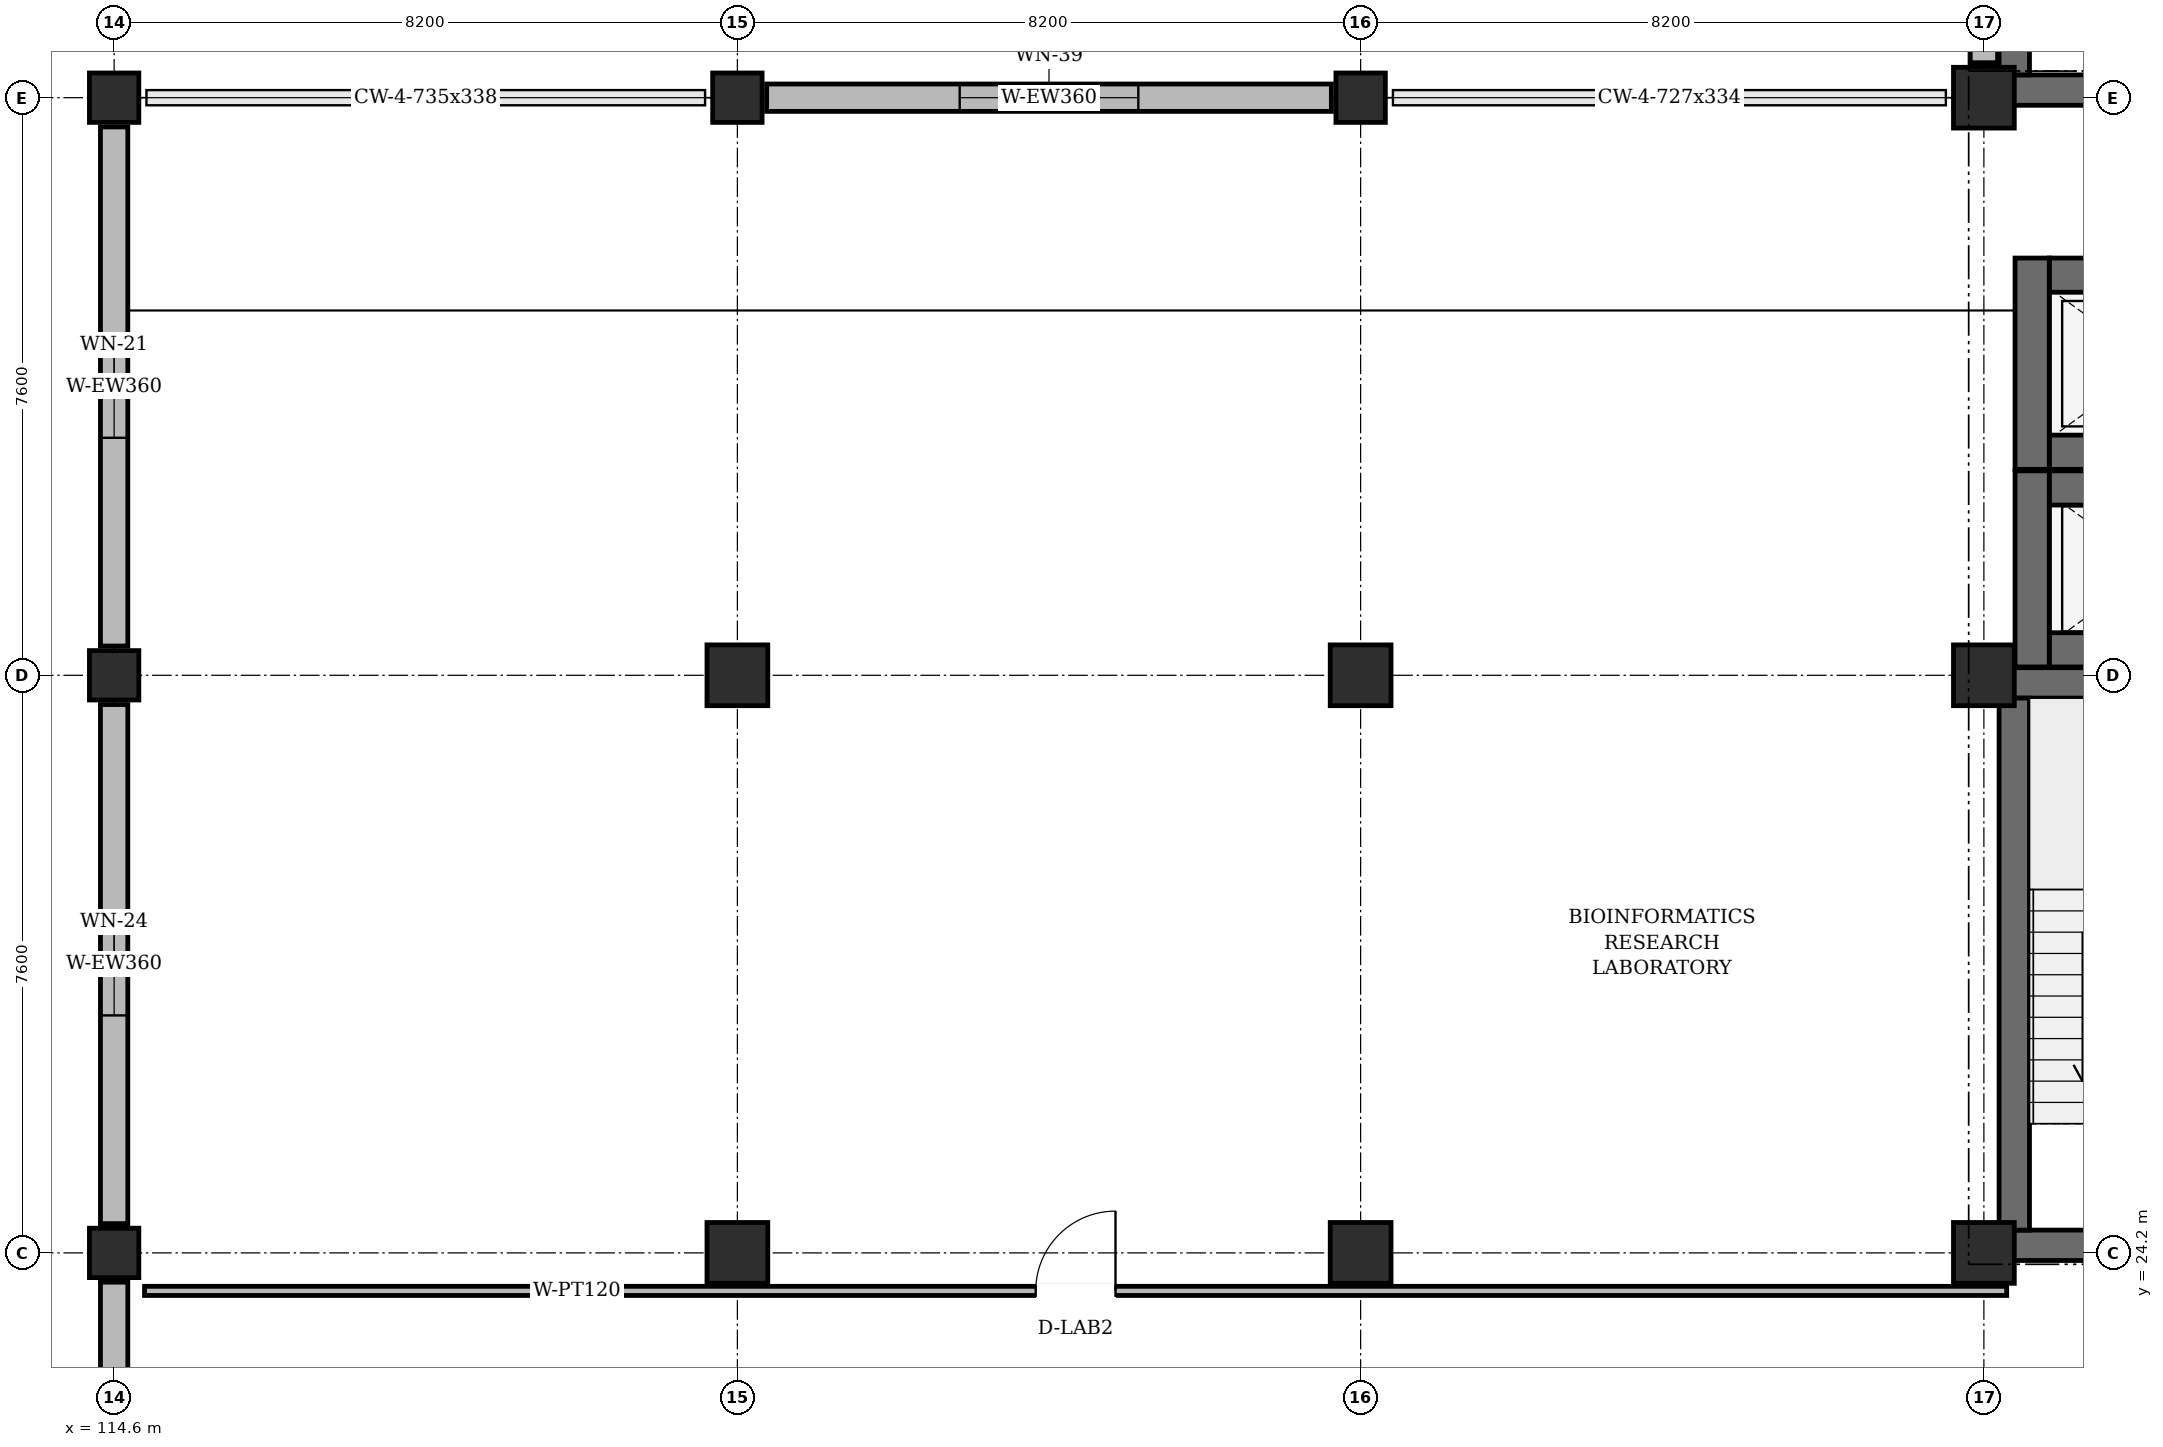
"""IFC4 building model, lengths in metres.
Left out: names, types, materials, properties, quantities, classifications, styles, units other than length and angle.
Written with IfcOpenShell. Run it as: python <this file> out.ifc"""

import sys

from ifc_helpers import new_model, si_unit, direction, frame, frame_2d, origin, origin_2d, place, context, subcontext, project, spatial, rectangle, extrude, element, fill, save


model = new_model("IFC4")
c1 = context("Model", 3, precision=1e-05, world=origin(), true_north=direction((0.0, 1.0)))
c2 = subcontext(c1, "Body", "Model", "MODEL_VIEW")
j1 = project(units=[si_unit("LENGTHUNIT", "METRE"), si_unit("PLANEANGLEUNIT", "RADIAN")], contexts=[c1])
p1 = place(None, origin())
s1 = spatial("IfcSite", under=j1, at=p1, CompositionType="ELEMENT")
p2 = place(p1, origin())
s2 = spatial("IfcBuilding", under=s1, at=p2, CompositionType="ELEMENT")
p3 = place(p2, frame((0.0, 0.0, 32.4)))
s3 = spatial("IfcBuildingStorey", under=s2, at=p3, CompositionType="ELEMENT", Elevation=32.4)
for number, where, z_axis, x_axis in (
    (1, (114.6, 24.2, 0.0), (0.0, 0.0, 1.0), (1.0, 0.0, 0.0)),
    (2, (114.6, 31.8, 0.0), (0.0, 0.0, 1.0), (1.0, 0.0, 0.0)),
    (3, (114.6, 39.4, 0.0), (0.0, 0.0, 1.0), (1.0, 0.0, 0.0)),
):
    element("IfcColumn", number, at=place(p3, frame(where, z_axis=z_axis, x_axis=x_axis)), inside=s3, PredefinedType="COLUMN", context=c2, shape_type="SweptSolid", body=[
        extrude(rectangle(XDim=0.65, YDim=0.65, at=origin_2d()), origin(), (0.0, 0.0, 1.0), 3.985),
    ])
for number, where, z_axis, x_axis in (
    (4, (122.8, 24.2, 0.0), (0.0, 0.0, 1.0), (1.0, 0.0, 0.0)),
    (5, (122.8, 31.8, 0.0), (0.0, 0.0, 1.0), (1.0, 0.0, 0.0)),
):
    element("IfcColumn", number, at=place(p3, frame(where, z_axis=z_axis, x_axis=x_axis)), inside=s3, PredefinedType="COLUMN", context=c2, shape_type="SweptSolid", body=[
        extrude(rectangle(XDim=0.8, YDim=0.8, at=origin_2d()), origin(), (0.0, 0.0, 1.0), 3.985),
    ])
p4 = place(p3, frame((122.8, 39.4, 0.0), z_axis=(0.0, 0.0, 1.0), x_axis=(1.0, 0.0, 0.0)))
e6 = element("IfcColumn", 6, at=p4, inside=s3, PredefinedType="COLUMN", context=c2, shape_type="SweptSolid", body=[
    extrude(rectangle(XDim=0.65, YDim=0.65, at=origin_2d()), origin(), (0.0, 0.0, 1.0), 3.945),
])
for number, where, z_axis, x_axis in (
    (7, (131.0, 24.2, 0.0), (0.0, 0.0, 1.0), (1.0, 0.0, 0.0)),
    (8, (131.0, 31.8, 0.0), (0.0, 0.0, 1.0), (1.0, 0.0, 0.0)),
):
    element("IfcColumn", number, at=place(p3, frame(where, z_axis=z_axis, x_axis=x_axis)), inside=s3, PredefinedType="COLUMN", context=c2, shape_type="SweptSolid", body=[
        extrude(rectangle(XDim=0.8, YDim=0.8, at=origin_2d()), origin(), (0.0, 0.0, 1.0), 3.89),
    ])
p5 = place(p3, frame((131.0, 39.4, 0.0), z_axis=(0.0, 0.0, 1.0), x_axis=(1.0, 0.0, 0.0)))
e9 = element("IfcColumn", 9, at=p5, inside=s3, PredefinedType="COLUMN", context=c2, shape_type="SweptSolid", body=[
    extrude(rectangle(XDim=0.65, YDim=0.65, at=origin_2d()), origin(), (0.0, 0.0, 1.0), 3.945),
])
for number, where, z_axis, x_axis in (
    (10, (139.2, 24.2, 0.0), (0.0, 0.0, 1.0), (1.0, 0.0, 0.0)),
    (11, (139.2, 31.8, 0.0), (0.0, 0.0, 1.0), (1.0, 0.0, 0.0)),
    (12, (139.2, 39.4, 0.0), (0.0, 0.0, 1.0), (1.0, 0.0, 0.0)),
):
    element("IfcColumn", number, at=place(p3, frame(where, z_axis=z_axis, x_axis=x_axis)), inside=s3, PredefinedType="COLUMN", context=c2, shape_type="SweptSolid", body=[
        extrude(rectangle(XDim=0.8, YDim=0.8, at=origin_2d()), origin(), (0.0, 0.0, 1.0), 3.89),
    ])
p6 = place(p3, frame((139.2, 46.54, 0.0), z_axis=(0.0, 0.0, 1.0), x_axis=(0.0, -1.0, 0.0)))
e13 = element("IfcWall", 13, at=p6, inside=s3, PredefinedType="SOLIDWALL", context=c2, shape_type="SweptSolid", body=[
    extrude(rectangle(XDim=6.68, YDim=0.36, at=frame_2d((3.34, 0.0))), origin(), (0.0, 0.0, 1.0), 3.275),
])
p7 = place(p3, frame((130.615, 39.4, 0.0), z_axis=(0.0, 0.0, 1.0), x_axis=(-1.0, 0.0, 0.0)))
e14 = element("IfcWall", 14, at=p7, inside=s3, PredefinedType="SOLIDWALL", context=c2, shape_type="SweptSolid", body=[
    extrude(rectangle(XDim=7.43, YDim=0.36, at=frame_2d((3.715, 0.0))), origin(), (0.0, 0.0, 1.0), 3.33),
])
p8 = place(p7, frame((2.54, 0.0, 0.95)))
e15 = element("IfcOpeningElement", 15, at=p8, cuts=e14, PredefinedType="OPENING", context=c2, shape_type="SweptSolid", body=[
    extrude(rectangle(XDim=2.35, YDim=1.75, at=frame_2d((1.175, 0.875))), frame((0.0, 0.192, 0.0), z_axis=(0.0, -1.0, 0.0), x_axis=(1.0, 0.0, 0.0)), (0.0, 0.0, 1.0), 0.384),
])
p9 = place(p3, frame((114.6, 39.015, 0.0), z_axis=(0.0, 0.0, 1.0), x_axis=(0.0, -1.0, 0.0)))
e16 = element("IfcWall", 16, at=p9, inside=s3, PredefinedType="SOLIDWALL", context=c2, shape_type="SweptSolid", body=[
    extrude(rectangle(XDim=6.83, YDim=0.36, at=frame_2d((3.415, 0.0))), origin(), (0.0, 0.0, 1.0), 3.37),
])
p10 = place(p9, frame((2.74, 0.0, 0.95)))
e17 = element("IfcOpeningElement", 17, at=p10, cuts=e16, PredefinedType="OPENING", context=c2, shape_type="SweptSolid", body=[
    extrude(rectangle(XDim=1.35, YDim=1.25, at=frame_2d((0.675, 0.625))), frame((0.0, 0.192, 0.0), z_axis=(0.0, -1.0, 0.0), x_axis=(1.0, 0.0, 0.0)), (0.0, 0.0, 1.0), 0.384),
])
p11 = place(p3, frame((114.6, 31.415, 0.0), z_axis=(0.0, 0.0, 1.0), x_axis=(0.0, -1.0, 0.0)))
e18 = element("IfcWall", 18, at=p11, inside=s3, PredefinedType="SOLIDWALL", context=c2, shape_type="SweptSolid", body=[
    extrude(rectangle(XDim=6.83, YDim=0.36, at=frame_2d((3.415, 0.0))), origin(), (0.0, 0.0, 1.0), 3.37),
])
p12 = place(p11, frame((2.74, 0.0, 0.95)))
e19 = element("IfcOpeningElement", 19, at=p12, cuts=e18, PredefinedType="OPENING", context=c2, shape_type="SweptSolid", body=[
    extrude(rectangle(XDim=1.35, YDim=2.05, at=frame_2d((0.675, 1.025))), frame((0.0, 0.192, 0.0), z_axis=(0.0, -1.0, 0.0), x_axis=(1.0, 0.0, 0.0)), (0.0, 0.0, 1.0), 0.384),
])
p13 = place(p3, frame((114.6, 23.815, 0.0), z_axis=(0.0, 0.0, 1.0), x_axis=(0.0, -1.0, 0.0)))
e20 = element("IfcWall", 20, at=p13, inside=s3, PredefinedType="SOLIDWALL", context=c2, shape_type="SweptSolid", body=[
    extrude(rectangle(XDim=6.83, YDim=0.36, at=frame_2d((3.415, 0.0))), origin(), (0.0, 0.0, 1.0), 3.37),
])
p14 = place(p13, frame((2.64, 0.0, 0.95)))
e21 = element("IfcOpeningElement", 21, at=p14, cuts=e20, PredefinedType="OPENING", context=c2, shape_type="SweptSolid", body=[
    extrude(rectangle(XDim=1.55, YDim=1.75, at=frame_2d((0.775, 0.875))), frame((0.0, 0.192, 0.0), z_axis=(0.0, -1.0, 0.0), x_axis=(1.0, 0.0, 0.0)), (0.0, 0.0, 1.0), 0.384),
])
p15 = place(p3, frame((139.4, 24.3, 0.0), z_axis=(0.0, 0.0, 1.0), x_axis=(1.0, 0.0, 0.0)))
e22 = element("IfcWall", 22, at=p15, inside=s3, PredefinedType="SHEAR", context=c2, shape_type="SweptSolid", body=[
    extrude(rectangle(XDim=3.8, YDim=0.4, at=frame_2d((1.9, 0.0))), origin(), (0.0, 0.0, 1.0), 3.89),
])
p16 = place(p15, frame((1.3, 0.0, 0.0)))
e23 = element("IfcOpeningElement", 23, at=p16, cuts=e22, PredefinedType="OPENING", context=c2, shape_type="SweptSolid", body=[
    extrude(rectangle(XDim=1.2, YDim=2.2, at=frame_2d((0.6, 1.1))), frame((0.0, 0.212, 0.0), z_axis=(0.0, -1.0, 0.0), x_axis=(1.0, 0.0, 0.0)), (0.0, 0.0, 1.0), 0.424),
])
p17 = place(p3, frame((139.4, 31.7, 0.0), z_axis=(0.0, 0.0, 1.0), x_axis=(1.0, 0.0, 0.0)))
e24 = element("IfcWall", 24, at=p17, inside=s3, PredefinedType="SHEAR", context=c2, shape_type="SweptSolid", body=[
    extrude(rectangle(XDim=3.8, YDim=0.4, at=frame_2d((1.9, 0.0))), origin(), (0.0, 0.0, 1.0), 3.89),
])
p18 = place(p3, frame((139.6, 24.5, 0.0), z_axis=(0.0, 0.0, 1.0), x_axis=(0.0, 1.0, 0.0)))
e25 = element("IfcWall", 25, at=p18, inside=s3, PredefinedType="SHEAR", context=c2, shape_type="SweptSolid", body=[
    extrude(rectangle(XDim=7.0, YDim=0.4, at=frame_2d((3.5, 0.0))), origin(), (0.0, 0.0, 1.0), 3.89),
])
p19 = place(p3, frame((139.4, 39.5, 0.0), z_axis=(0.0, 0.0, 1.0), x_axis=(1.0, 0.0, 0.0)))
e26 = element("IfcWall", 26, at=p19, inside=s3, PredefinedType="SHEAR", context=c2, shape_type="SweptSolid", body=[
    extrude(rectangle(XDim=3.8, YDim=0.4, at=frame_2d((1.9, 0.0))), origin(), (0.0, 0.0, 1.0), 3.89),
])
p20 = place(p19, frame((1.3, 0.0, 0.0)))
e27 = element("IfcOpeningElement", 27, at=p20, cuts=e26, PredefinedType="OPENING", context=c2, shape_type="SweptSolid", body=[
    extrude(rectangle(XDim=1.2, YDim=2.2, at=frame_2d((0.6, 1.1))), frame((0.0, 0.212, 0.0), z_axis=(0.0, -1.0, 0.0), x_axis=(1.0, 0.0, 0.0)), (0.0, 0.0, 1.0), 0.424),
])
p21 = place(p3, frame((139.6, 39.7, 0.0), z_axis=(0.0, 0.0, 1.0), x_axis=(0.0, 1.0, 0.0)))
e28 = element("IfcWall", 28, at=p21, inside=s3, PredefinedType="SHEAR", context=c2, shape_type="SweptSolid", body=[
    extrude(rectangle(XDim=7.0, YDim=0.4, at=frame_2d((3.5, 0.0))), origin(), (0.0, 0.0, 1.0), 3.89),
])
for number, where, z_axis, x_axis in (
    (29, (140.06, 32.135, 0.0), (0.0, 0.0, 1.0), (1.0, 0.0, 0.0)),
    (30, (140.06, 34.265, 0.0), (0.0, 0.0, 1.0), (1.0, 0.0, 0.0)),
):
    element("IfcWall", number, at=place(p3, frame(where, z_axis=z_axis, x_axis=x_axis)), inside=s3, PredefinedType="SHEAR", context=c2, shape_type="SweptSolid", body=[
        extrude(rectangle(XDim=2.74, YDim=0.45, at=frame_2d((1.37, 0.0))), origin(), (0.0, 0.0, 1.0), 3.89),
    ])
p22 = place(p3, frame((139.835, 31.91, 0.0), z_axis=(0.0, 0.0, 1.0), x_axis=(0.0, 1.0, 0.0)))
e31 = element("IfcWall", 31, at=p22, inside=s3, PredefinedType="SHEAR", context=c2, shape_type="SweptSolid", body=[
    extrude(rectangle(XDim=2.58, YDim=0.45, at=frame_2d((1.29, 0.0))), origin(), (0.0, 0.0, 1.0), 3.89),
])
for number, where, z_axis, x_axis in (
    (32, (140.06, 34.735, 0.0), (0.0, 0.0, 1.0), (1.0, 0.0, 0.0)),
    (33, (140.06, 37.065, 0.0), (0.0, 0.0, 1.0), (1.0, 0.0, 0.0)),
):
    element("IfcWall", number, at=place(p3, frame(where, z_axis=z_axis, x_axis=x_axis)), inside=s3, PredefinedType="SHEAR", context=c2, shape_type="SweptSolid", body=[
        extrude(rectangle(XDim=2.74, YDim=0.45, at=frame_2d((1.37, 0.0))), origin(), (0.0, 0.0, 1.0), 3.89),
    ])
p23 = place(p3, frame((139.835, 34.51, 0.0), z_axis=(0.0, 0.0, 1.0), x_axis=(0.0, 1.0, 0.0)))
e34 = element("IfcWall", 34, at=p23, inside=s3, PredefinedType="SHEAR", context=c2, shape_type="SweptSolid", body=[
    extrude(rectangle(XDim=2.78, YDim=0.45, at=frame_2d((1.39, 0.0))), origin(), (0.0, 0.0, 1.0), 3.89),
])
p24 = place(p3, frame((115.0, 23.7, 0.0), z_axis=(0.0, 0.0, 1.0), x_axis=(1.0, 0.0, 0.0)))
e35 = element("IfcWall", 35, at=p24, inside=s3, PredefinedType="PARTITIONING", context=c2, shape_type="SweptSolid", body=[
    extrude(rectangle(XDim=24.5, YDim=0.12, at=frame_2d((12.25, 0.0))), origin(), (0.0, 0.0, 1.0), 3.805),
])
p25 = place(p24, frame((11.725, 0.0, 0.0)))
e36 = element("IfcOpeningElement", 36, at=p25, cuts=e35, PredefinedType="OPENING", context=c2, shape_type="SweptSolid", body=[
    extrude(rectangle(XDim=1.05, YDim=2.2, at=frame_2d((0.525, 1.1))), frame((0.0, 0.072, 0.0), z_axis=(0.0, -1.0, 0.0), x_axis=(1.0, 0.0, 0.0)), (0.0, 0.0, 1.0), 0.144),
])
p26 = place(p8, origin())
e37 = element("IfcWindow", 37, at=p26, inside=s3, PartitioningType="DOUBLE_PANEL_VERTICAL", PredefinedType="WINDOW", context=c2, shape_type="SweptSolid", body=[
    extrude(rectangle(XDim=2.35, YDim=1.75, at=frame_2d((1.175, 0.875))), frame((0.0, 0.03, 0.0), z_axis=(0.0, -1.0, 0.0), x_axis=(1.0, 0.0, 0.0)), (0.0, 0.0, 1.0), 0.06),
])
fill(e15, e37)
p27 = place(p10, origin())
e38 = element("IfcWindow", 38, at=p27, inside=s3, PartitioningType="SINGLE_PANEL", PredefinedType="WINDOW", context=c2, shape_type="SweptSolid", body=[
    extrude(rectangle(XDim=1.35, YDim=1.25, at=frame_2d((0.675, 0.625))), frame((0.0, 0.03, 0.0), z_axis=(0.0, -1.0, 0.0), x_axis=(1.0, 0.0, 0.0)), (0.0, 0.0, 1.0), 0.06),
])
fill(e17, e38)
p28 = place(p12, origin())
e39 = element("IfcWindow", 39, at=p28, inside=s3, PartitioningType="SINGLE_PANEL", PredefinedType="WINDOW", context=c2, shape_type="SweptSolid", body=[
    extrude(rectangle(XDim=1.35, YDim=2.05, at=frame_2d((0.675, 1.025))), frame((0.0, 0.03, 0.0), z_axis=(0.0, -1.0, 0.0), x_axis=(1.0, 0.0, 0.0)), (0.0, 0.0, 1.0), 0.06),
])
fill(e19, e39)
p29 = place(p25, origin())
e40 = element("IfcDoor", 40, at=p29, inside=s3, OperationType="SINGLE_SWING_RIGHT", PredefinedType="DOOR", context=c2, shape_type="SweptSolid", body=[
    extrude(rectangle(XDim=1.05, YDim=2.2, at=frame_2d((0.525, 1.1))), frame((0.0, 0.025, 0.0), z_axis=(0.0, -1.0, 0.0), x_axis=(1.0, 0.0, 0.0)), (0.0, 0.0, 1.0), 0.05),
])
fill(e36, e40)
save(model, sys.argv[1])
